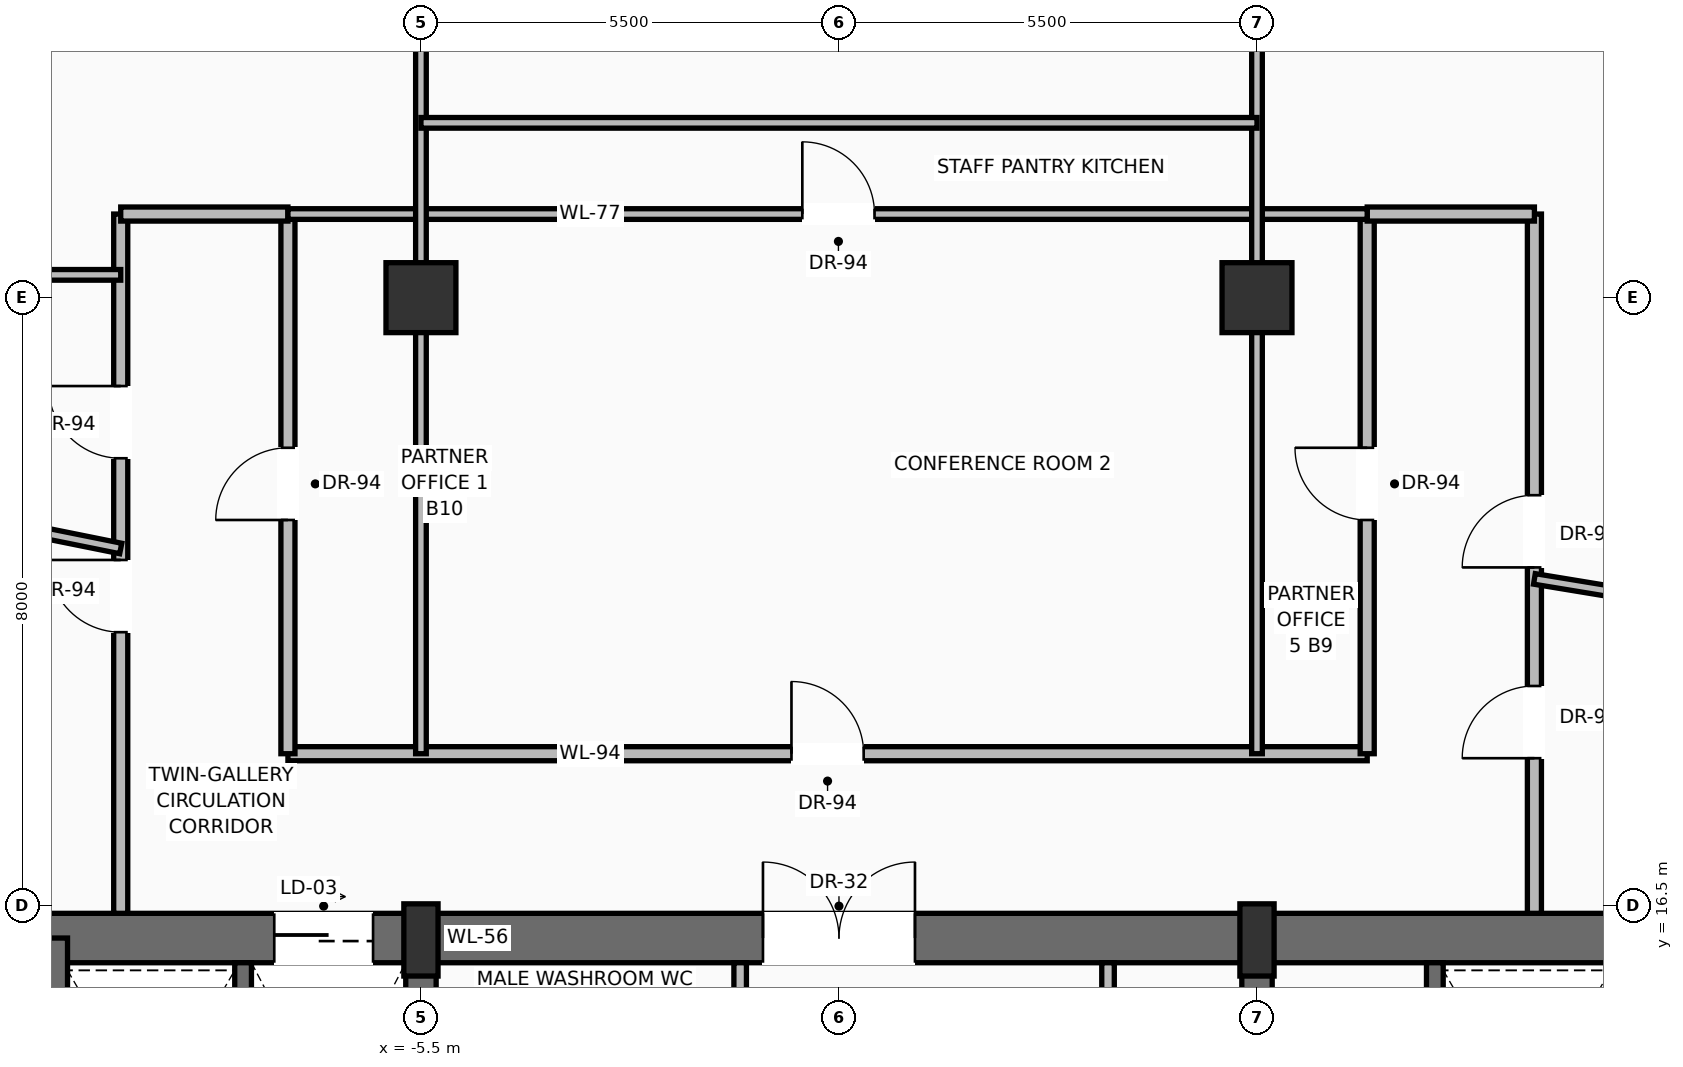
"""IFC4 building model, lengths in metres.
Left out: names, types, materials, properties, quantities, classifications, styles, units other than length and angle.
Written with IfcOpenShell. Run it as: python <this file> out.ifc"""

import sys

from ifc_helpers import new_model, si_unit, direction, frame, frame_2d, origin, origin_2d, place, context, subcontext, project, spatial, rectangle, extrude, source, transform, mapped, element, fill, save


model = new_model("IFC4")
c1 = context("Model", 3, precision=1e-05, world=origin(), true_north=direction((0.0, 1.0)))
c2 = subcontext(c1, "Body", "Model", "MODEL_VIEW")
j1 = project(units=[si_unit("LENGTHUNIT", "METRE"), si_unit("PLANEANGLEUNIT", "RADIAN")], contexts=[c1])
p1 = place(None, origin())
s1 = spatial("IfcSite", under=j1, at=p1, CompositionType="ELEMENT")
p2 = place(p1, origin())
s2 = spatial("IfcBuilding", under=s1, at=p2, CompositionType="ELEMENT")
p3 = place(p2, frame((0.0, 0.0, 178.4)))
s3 = spatial("IfcBuildingStorey", under=s2, at=p3, CompositionType="ELEMENT", Elevation=178.4)
p4 = place(p3, frame((-10.8, 16.075, 0.0), z_axis=(0.0, 0.0, 1.0), x_axis=(1.0, 0.0, 0.0)))
e1 = element("IfcWall", 1, at=p4, inside=s3, PredefinedType="SHEAR", context=c2, shape_type="SweptSolid", body=[
    extrude(rectangle(XDim=21.6, YDim=0.65, at=frame_2d((10.8, 0.0))), origin(), (0.0, 0.0, 1.0), 3.47),
])
p5 = place(p4, frame((3.37, 0.0, 0.0)))
e2 = element("IfcOpeningElement", 2, at=p5, cuts=e1, PredefinedType="OPENING", context=c2, shape_type="SweptSolid", body=[
    extrude(rectangle(XDim=1.3, YDim=2.3, at=frame_2d((0.65, 1.15))), frame((0.0, 0.335, 0.0), z_axis=(0.0, -1.0, 0.0), x_axis=(1.0, 0.0, 0.0)), (0.0, 0.0, 1.0), 0.67),
])
p6 = place(p4, frame((9.8, 0.0, 0.0)))
e3 = element("IfcOpeningElement", 3, at=p6, cuts=e1, PredefinedType="OPENING", context=c2, shape_type="SweptSolid", body=[
    extrude(rectangle(XDim=2.0, YDim=2.4, at=frame_2d((1.0, 1.2))), frame((0.0, 0.335, 0.0), z_axis=(0.0, -1.0, 0.0), x_axis=(1.0, 0.0, 0.0)), (0.0, 0.0, 1.0), 0.67),
])
p7 = place(p3, frame((-10.475, 0.525, 0.0), z_axis=(0.0, 0.0, 1.0), x_axis=(0.0, 1.0, 0.0)))
e4 = element("IfcWall", 4, at=p7, inside=s3, PredefinedType="SHEAR", context=c2, shape_type="SweptSolid", body=[
    extrude(rectangle(XDim=15.55, YDim=0.65, at=frame_2d((7.775, 0.0))), origin(), (0.0, 0.0, 1.0), 3.47),
])
p8 = place(p3, frame((-5.5, 0.525, 0.0), z_axis=(0.0, 0.0, 1.0), x_axis=(0.0, 1.0, 0.0)))
e5 = element("IfcWall", 5, at=p8, inside=s3, PredefinedType="SHEAR", context=c2, shape_type="SweptSolid", body=[
    extrude(rectangle(XDim=15.55, YDim=0.4, at=frame_2d((7.775, 0.0))), origin(), (0.0, 0.0, 1.0), 3.47),
])
p9 = place(p8, frame((8.975, 0.0, 0.0)))
e6 = element("IfcOpeningElement", 6, at=p9, cuts=e5, PredefinedType="OPENING", context=c2, shape_type="SweptSolid", body=[
    extrude(rectangle(XDim=1.1, YDim=2.2, at=frame_2d((0.55, 1.1))), frame((0.0, 0.21, 0.0), z_axis=(0.0, -1.0, 0.0), x_axis=(1.0, 0.0, 0.0)), (0.0, 0.0, 1.0), 0.42),
])
p10 = place(p3, frame((5.5, 0.525, 0.0), z_axis=(0.0, 0.0, 1.0), x_axis=(0.0, 1.0, 0.0)))
e7 = element("IfcWall", 7, at=p10, inside=s3, PredefinedType="SHEAR", context=c2, shape_type="SweptSolid", body=[
    extrude(rectangle(XDim=15.55, YDim=0.4, at=frame_2d((7.775, 0.0))), origin(), (0.0, 0.0, 1.0), 3.47),
])
p11 = place(p10, frame((8.975, 0.0, 0.0)))
e8 = element("IfcOpeningElement", 8, at=p11, cuts=e7, PredefinedType="OPENING", context=c2, shape_type="SweptSolid", body=[
    extrude(rectangle(XDim=1.1, YDim=2.2, at=frame_2d((0.55, 1.1))), frame((0.0, 0.21, 0.0), z_axis=(0.0, -1.0, 0.0), x_axis=(1.0, 0.0, 0.0)), (0.0, 0.0, 1.0), 0.42),
])
m1 = source(origin(), c2, "Body", "SweptSolid", [
    extrude(rectangle(XDim=0.45, YDim=0.95, at=origin_2d()), origin(), (0.0, 0.0, 1.0), 3.7),
])
for number, where, z_axis, x_axis in (
    (9, (-5.5, 16.05, 0.0), (0.0, 0.0, 1.0), (1.0, 0.0, 0.0)),
    (10, (5.5, 16.05, 0.0), (0.0, 0.0, 1.0), (1.0, 0.0, 0.0)),
):
    element("IfcColumn", number, at=place(p3, frame(where, z_axis=z_axis, x_axis=x_axis)), inside=s3, PredefinedType="PILASTER", context=c2, shape_type="MappedRepresentation", body=[
        mapped(m1, transform((0.0, 0.0, 0.0), scale=1.0)),
    ])
m2 = source(origin(), c2, "Body", "SweptSolid", [
    extrude(rectangle(XDim=0.92, YDim=0.92, at=origin_2d()), origin(), (0.0, 0.0, 1.0), 3.7),
])
for number, where, z_axis, x_axis in (
    (11, (-5.5, 24.5, 0.0), (0.0, 0.0, 1.0), (1.0, 0.0, 0.0)),
    (12, (5.5, 24.5, 0.0), (0.0, 0.0, 1.0), (1.0, 0.0, 0.0)),
):
    element("IfcColumn", number, at=place(p3, frame(where, z_axis=z_axis, x_axis=x_axis)), inside=s3, PredefinedType="COLUMN", context=c2, shape_type="MappedRepresentation", body=[
        mapped(m2, transform((0.0, 0.0, 0.0), scale=1.0)),
    ])
p12 = place(p3, frame((10.167, 32.463, 0.0), z_axis=(0.0, 0.0, 1.0), x_axis=(0.535575528783, -0.844487331444, 0.0)))
e13 = element("IfcWall", 13, at=p12, inside=s3, PredefinedType="SOLIDWALL", context=c2, shape_type="SweptSolid", body=[
    extrude(rectangle(XDim=18.76, YDim=0.28, at=frame_2d((9.38, 0.0))), origin(), (0.0, 0.0, 1.0), 3.05),
])
p13 = place(p12, frame((4.502, 0.0, 0.0)))
e14 = element("IfcOpeningElement", 14, at=p13, cuts=e13, PredefinedType="OPENING", context=c2, shape_type="SweptSolid", body=[
    extrude(rectangle(XDim=1.6, YDim=2.35, at=frame_2d((0.8, 1.175))), frame((0.0, 0.15, 0.0), z_axis=(0.0, -1.0, 0.0), x_axis=(1.0, 0.0, 0.0)), (0.0, 0.0, 1.0), 0.3),
])
p14 = place(p12, frame((12.757, 0.0, 0.9)))
e15 = element("IfcOpeningElement", 15, at=p14, cuts=e13, PredefinedType="OPENING", context=c2, shape_type="SweptSolid", body=[
    extrude(rectangle(XDim=1.55, YDim=1.85, at=frame_2d((0.775, 0.925))), frame((0.0, 0.15, 0.0), z_axis=(0.0, -1.0, 0.0), x_axis=(1.0, 0.0, 0.0)), (0.0, 0.0, 1.0), 0.3),
])
for number, where, z_axis, x_axis in (
    (16, (-7.84, 11.87, 0.0), (0.0, 0.0, 1.0), (0.0, 1.0, 0.0)),
    (17, (7.84, 11.87, 0.0), (0.0, 0.0, 1.0), (0.0, 1.0, 0.0)),
):
    element("IfcWall", number, at=place(p3, frame(where, z_axis=z_axis, x_axis=x_axis)), inside=s3, PredefinedType="SOLIDWALL", context=c2, shape_type="SweptSolid", body=[
        extrude(rectangle(XDim=3.88, YDim=0.22, at=frame_2d((1.94, 0.0))), origin(), (0.0, 0.0, 1.0), 3.47),
    ])
p15 = place(p3, frame((-1.3, 13.6, 0.0), z_axis=(0.0, 0.0, 1.0), x_axis=(0.0, 1.0, 0.0)))
e18 = element("IfcWall", 18, at=p15, inside=s3, PredefinedType="PARTITIONING", context=c2, shape_type="SweptSolid", body=[
    extrude(rectangle(XDim=2.15, YDim=0.165, at=frame_2d((1.075, 0.0))), origin(), (0.0, 0.0, 1.0), 3.462),
])
p16 = place(p15, frame((0.55, 0.0, 0.0)))
e19 = element("IfcOpeningElement", 19, at=p16, cuts=e18, PredefinedType="OPENING", context=c2, shape_type="SweptSolid", body=[
    extrude(rectangle(XDim=0.9, YDim=2.1, at=frame_2d((0.45, 1.05))), frame((0.0, 0.093, 0.0), z_axis=(0.0, -1.0, 0.0), x_axis=(1.0, 0.0, 0.0)), (0.0, 0.0, 1.0), 0.185),
])
p17 = place(p3, frame((3.54, 11.22, 0.0), z_axis=(0.0, 0.0, 1.0), x_axis=(0.0, 1.0, 0.0)))
e20 = element("IfcWall", 20, at=p17, inside=s3, PredefinedType="PARTITIONING", context=c2, shape_type="SweptSolid", body=[
    extrude(rectangle(XDim=4.53, YDim=0.165, at=frame_2d((2.265, 0.0))), origin(), (0.0, 0.0, 1.0), 3.462),
])
p18 = place(p17, frame((1.25, 0.0, 0.0)))
e21 = element("IfcOpeningElement", 21, at=p18, cuts=e20, PredefinedType="OPENING", context=c2, shape_type="SweptSolid", body=[
    extrude(rectangle(XDim=0.9, YDim=2.1, at=frame_2d((0.45, 1.05))), frame((0.0, 0.093, 0.0), z_axis=(0.0, -1.0, 0.0), x_axis=(1.0, 0.0, 0.0)), (0.0, 0.0, 1.0), 0.185),
])
p19 = place(p3, frame((-7.25, 18.5, 0.0), z_axis=(0.0, 0.0, 1.0), x_axis=(1.0, 0.0, 0.0)))
e22 = element("IfcWall", 22, at=p19, inside=s3, PredefinedType="PARTITIONING", context=c2, shape_type="SweptSolid", body=[
    extrude(rectangle(XDim=14.2, YDim=0.185, at=frame_2d((7.1, 0.0))), origin(), (0.0, 0.0, 1.0), 2.846),
])
p20 = place(p19, frame((6.625, 0.0, 0.0)))
e23 = element("IfcOpeningElement", 23, at=p20, cuts=e22, PredefinedType="OPENING", context=c2, shape_type="SweptSolid", body=[
    extrude(rectangle(XDim=0.95, YDim=2.2, at=frame_2d((0.475, 1.1))), frame((0.0, 0.103, 0.0), z_axis=(0.0, -1.0, 0.0), x_axis=(1.0, 0.0, 0.0)), (0.0, 0.0, 1.0), 0.205),
])
p21 = place(p3, frame((-7.25, 18.5, 0.0), z_axis=(0.0, 0.0, 1.0), x_axis=(0.0, 1.0, 0.0)))
e24 = element("IfcWall", 24, at=p21, inside=s3, PredefinedType="PARTITIONING", context=c2, shape_type="SweptSolid", body=[
    extrude(rectangle(XDim=7.1, YDim=0.185, at=frame_2d((3.55, 0.0))), origin(), (0.0, 0.0, 1.0), 2.846),
])
p22 = place(p21, frame((3.075, 0.0, 0.0)))
e25 = element("IfcOpeningElement", 25, at=p22, cuts=e24, PredefinedType="OPENING", context=c2, shape_type="SweptSolid", body=[
    extrude(rectangle(XDim=0.95, YDim=2.2, at=frame_2d((0.475, 1.1))), frame((0.0, 0.103, 0.0), z_axis=(0.0, -1.0, 0.0), x_axis=(1.0, 0.0, 0.0)), (0.0, 0.0, 1.0), 0.205),
])
p23 = place(p3, frame((6.95, 18.5, 0.0), z_axis=(0.0, 0.0, 1.0), x_axis=(0.0, 1.0, 0.0)))
e26 = element("IfcWall", 26, at=p23, inside=s3, PredefinedType="PARTITIONING", context=c2, shape_type="SweptSolid", body=[
    extrude(rectangle(XDim=7.1, YDim=0.185, at=frame_2d((3.55, 0.0))), origin(), (0.0, 0.0, 1.0), 2.846),
])
p24 = place(p23, frame((3.075, 0.0, 0.0)))
e27 = element("IfcOpeningElement", 27, at=p24, cuts=e26, PredefinedType="OPENING", context=c2, shape_type="SweptSolid", body=[
    extrude(rectangle(XDim=0.95, YDim=2.2, at=frame_2d((0.475, 1.1))), frame((0.0, 0.103, 0.0), z_axis=(0.0, -1.0, 0.0), x_axis=(1.0, 0.0, 0.0)), (0.0, 0.0, 1.0), 0.205),
])
p25 = place(p3, frame((-9.45, 16.4, 0.0), z_axis=(0.0, 0.0, 1.0), x_axis=(0.0, 1.0, 0.0)))
e28 = element("IfcWall", 28, at=p25, inside=s3, PredefinedType="PARTITIONING", context=c2, shape_type="SweptSolid", body=[
    extrude(rectangle(XDim=9.2, YDim=0.185, at=frame_2d((4.6, 0.0))), origin(), (0.0, 0.0, 1.0), 2.846),
])
p26 = place(p25, frame((3.699, 0.0, 0.0)))
e29 = element("IfcOpeningElement", 29, at=p26, cuts=e28, PredefinedType="OPENING", context=c2, shape_type="SweptSolid", body=[
    extrude(rectangle(XDim=0.95, YDim=2.2, at=frame_2d((0.475, 1.1))), frame((0.0, 0.103, 0.0), z_axis=(0.0, -1.0, 0.0), x_axis=(1.0, 0.0, 0.0)), (0.0, 0.0, 1.0), 0.205),
])
p27 = place(p25, frame((5.987, 0.0, 0.0)))
e30 = element("IfcOpeningElement", 30, at=p27, cuts=e28, PredefinedType="OPENING", context=c2, shape_type="SweptSolid", body=[
    extrude(rectangle(XDim=0.95, YDim=2.2, at=frame_2d((0.475, 1.1))), frame((0.0, 0.103, 0.0), z_axis=(0.0, -1.0, 0.0), x_axis=(1.0, 0.0, 0.0)), (0.0, 0.0, 1.0), 0.205),
])
p28 = place(p3, frame((9.15, 16.4, 0.0), z_axis=(0.0, 0.0, 1.0), x_axis=(0.0, 1.0, 0.0)))
e31 = element("IfcWall", 31, at=p28, inside=s3, PredefinedType="PARTITIONING", context=c2, shape_type="SweptSolid", body=[
    extrude(rectangle(XDim=9.2, YDim=0.185, at=frame_2d((4.6, 0.0))), origin(), (0.0, 0.0, 1.0), 2.846),
])
p29 = place(p28, frame((4.551, 0.0, 0.0)))
e32 = element("IfcOpeningElement", 32, at=p29, cuts=e31, PredefinedType="OPENING", context=c2, shape_type="SweptSolid", body=[
    extrude(rectangle(XDim=0.95, YDim=2.2, at=frame_2d((0.475, 1.1))), frame((0.0, 0.103, 0.0), z_axis=(0.0, -1.0, 0.0), x_axis=(1.0, 0.0, 0.0)), (0.0, 0.0, 1.0), 0.205),
])
p30 = place(p28, frame((2.041, 0.0, 0.0)))
e33 = element("IfcOpeningElement", 33, at=p30, cuts=e31, PredefinedType="OPENING", context=c2, shape_type="SweptSolid", body=[
    extrude(rectangle(XDim=0.95, YDim=2.2, at=frame_2d((0.475, 1.1))), frame((0.0, 0.103, 0.0), z_axis=(0.0, -1.0, 0.0), x_axis=(1.0, 0.0, 0.0)), (0.0, 0.0, 1.0), 0.205),
])
for number, where, z_axis, x_axis in (
    (34, (-9.45, 25.6, 0.0), (0.0, 0.0, 1.0), (1.0, 0.0, 0.0)),
    (35, (6.95, 25.6, 0.0), (0.0, 0.0, 1.0), (1.0, 0.0, 0.0)),
):
    element("IfcWall", number, at=place(p3, frame(where, z_axis=z_axis, x_axis=x_axis)), inside=s3, PredefinedType="PARTITIONING", context=c2, shape_type="SweptSolid", body=[
        extrude(rectangle(XDim=2.2, YDim=0.185, at=frame_2d((1.1, 0.0))), origin(), (0.0, 0.0, 1.0), 3.462),
    ])
p31 = place(p3, frame((-7.25, 25.6, 0.0), z_axis=(0.0, 0.0, 1.0), x_axis=(1.0, 0.0, 0.0)))
e36 = element("IfcWall", 36, at=p31, inside=s3, PredefinedType="PARTITIONING", context=c2, shape_type="SweptSolid", body=[
    extrude(rectangle(XDim=14.2, YDim=0.14, at=frame_2d((7.1, 0.0))), origin(), (0.0, 0.0, 1.0), 3.462),
])
p32 = place(p31, frame((6.768, 0.0, 0.0)))
e37 = element("IfcOpeningElement", 37, at=p32, cuts=e36, PredefinedType="OPENING", context=c2, shape_type="SweptSolid", body=[
    extrude(rectangle(XDim=0.95, YDim=2.2, at=frame_2d((0.475, 1.1))), frame((0.0, 0.08, 0.0), z_axis=(0.0, -1.0, 0.0), x_axis=(1.0, 0.0, 0.0)), (0.0, 0.0, 1.0), 0.16),
])
for number, where, z_axis, x_axis in (
    (38, (-5.5, 18.5, 0.0), (0.0, 0.0, 1.0), (0.0, 1.0, 0.0)),
    (39, (5.5, 18.5, 0.0), (0.0, 0.0, 1.0), (0.0, 1.0, 0.0)),
):
    element("IfcWall", number, at=place(p3, frame(where, z_axis=z_axis, x_axis=x_axis)), inside=s3, PredefinedType="PARTITIONING", context=c2, shape_type="SweptSolid", body=[
        extrude(rectangle(XDim=14.0, YDim=0.14, at=frame_2d((7.0, 0.0))), origin(), (0.0, 0.0, 1.0), 2.846),
    ])
p33 = place(p3, frame((-5.5, 26.8, 0.0), z_axis=(0.0, 0.0, 1.0), x_axis=(1.0, 0.0, 0.0)))
e40 = element("IfcWall", 40, at=p33, inside=s3, PredefinedType="PARTITIONING", context=c2, shape_type="SweptSolid", body=[
    extrude(rectangle(XDim=11.0, YDim=0.14, at=frame_2d((5.5, 0.0))), origin(), (0.0, 0.0, 1.0), 3.462),
])
p34 = place(p3, frame((-16.728, 22.667, 0.0), z_axis=(0.0, 0.0, 1.0), x_axis=(0.980268299124, -0.197671600726, 0.0)))
e41 = element("IfcWall", 41, at=p34, inside=s3, PredefinedType="PARTITIONING", context=c2, shape_type="SweptSolid", body=[
    extrude(rectangle(XDim=7.424, YDim=0.14, at=frame_2d((3.712, 0.0))), origin(), (0.0, 0.0, 1.0), 3.049),
])
p35 = place(p3, frame((-15.394, 24.8, 0.0), z_axis=(0.0, 0.0, 1.0), x_axis=(1.0, 0.0, 0.0)))
e42 = element("IfcWall", 42, at=p35, inside=s3, PredefinedType="PARTITIONING", context=c2, shape_type="SweptSolid", body=[
    extrude(rectangle(XDim=5.944, YDim=0.14, at=frame_2d((2.972, 0.0))), origin(), (0.0, 0.0, 1.0), 3.462),
])
p36 = place(p3, frame((9.15, 20.8, 0.0), z_axis=(0.0, 0.0, 1.0), x_axis=(0.986738202505, -0.162319806916, 0.0)))
e43 = element("IfcWall", 43, at=p36, inside=s3, PredefinedType="PARTITIONING", context=c2, shape_type="SweptSolid", body=[
    extrude(rectangle(XDim=9.694, YDim=0.14, at=frame_2d((4.847, 0.0))), origin(), (0.0, 0.0, 1.0), 3.049),
])
m3 = source(origin(), c2, "Body", "SweptSolid", [
    extrude(rectangle(XDim=1.3, YDim=2.3, at=frame_2d((0.65, 1.15))), frame((0.0, 0.025, 0.0), z_axis=(0.0, -1.0, 0.0), x_axis=(1.0, 0.0, 0.0)), (0.0, 0.0, 1.0), 0.05),
])
p37 = place(p5, origin())
e44 = element("IfcDoor", 44, at=p37, inside=s3, OperationType="SLIDING_TO_RIGHT", PredefinedType="DOOR", context=c2, shape_type="MappedRepresentation", body=[
    mapped(m3, transform((0.0, 0.0, 0.0), scale=1.0)),
])
fill(e2, e44)
m4 = source(origin(), c2, "Body", "SweptSolid", [
    extrude(rectangle(XDim=2.0, YDim=2.4, at=frame_2d((1.0, 1.2))), frame((0.0, 0.025, 0.0), z_axis=(0.0, -1.0, 0.0), x_axis=(1.0, 0.0, 0.0)), (0.0, 0.0, 1.0), 0.05),
])
p38 = place(p6, origin())
e45 = element("IfcDoor", 45, at=p38, inside=s3, OperationType="DOUBLE_DOOR_SINGLE_SWING", PredefinedType="DOOR", context=c2, shape_type="MappedRepresentation", body=[
    mapped(m4, transform((0.0, 0.0, 0.0), scale=1.0)),
])
fill(e3, e45)
m5 = source(origin(), c2, "Body", "SweptSolid", [
    extrude(rectangle(XDim=0.95, YDim=2.2, at=frame_2d((0.475, 1.1))), frame((0.0, 0.025, 0.0), z_axis=(0.0, -1.0, 0.0), x_axis=(1.0, 0.0, 0.0)), (0.0, 0.0, 1.0), 0.05),
])
p39 = place(p20, origin())
e46 = element("IfcDoor", 46, at=p39, inside=s3, OperationType="SINGLE_SWING_LEFT", PredefinedType="DOOR", context=c2, shape_type="MappedRepresentation", body=[
    mapped(m5, transform((0.0, 0.0, 0.0), scale=1.0)),
])
fill(e23, e46)
p40 = place(p26, origin())
e47 = element("IfcDoor", 47, at=p40, inside=s3, OperationType="SINGLE_SWING_RIGHT", PredefinedType="DOOR", context=c2, shape_type="MappedRepresentation", body=[
    mapped(m5, transform((0.0, 0.0, 0.0), scale=1.0)),
])
fill(e29, e47)
p41 = place(p29, origin())
e48 = element("IfcDoor", 48, at=p41, inside=s3, OperationType="SINGLE_SWING_LEFT", PredefinedType="DOOR", context=c2, shape_type="MappedRepresentation", body=[
    mapped(m5, transform((0.0, 0.0, 0.0), scale=1.0)),
])
fill(e32, e48)
p42 = place(p30, origin())
e49 = element("IfcDoor", 49, at=p42, inside=s3, OperationType="SINGLE_SWING_LEFT", PredefinedType="DOOR", context=c2, shape_type="MappedRepresentation", body=[
    mapped(m5, transform((0.0, 0.0, 0.0), scale=1.0)),
])
fill(e33, e49)
p43 = place(p24, origin())
e50 = element("IfcDoor", 50, at=p43, inside=s3, OperationType="SINGLE_SWING_RIGHT", PredefinedType="DOOR", context=c2, shape_type="MappedRepresentation", body=[
    mapped(m5, transform((0.0, 0.0, 0.0), scale=1.0)),
])
fill(e27, e50)
p44 = place(p22, origin())
e51 = element("IfcDoor", 51, at=p44, inside=s3, OperationType="SINGLE_SWING_LEFT", PredefinedType="DOOR", context=c2, shape_type="MappedRepresentation", body=[
    mapped(m5, transform((0.0, 0.0, 0.0), scale=1.0)),
])
fill(e25, e51)
p45 = place(p27, origin())
e52 = element("IfcDoor", 52, at=p45, inside=s3, OperationType="SINGLE_SWING_RIGHT", PredefinedType="DOOR", context=c2, shape_type="MappedRepresentation", body=[
    mapped(m5, transform((0.0, 0.0, 0.0), scale=1.0)),
])
fill(e30, e52)
p46 = place(p32, origin())
e53 = element("IfcDoor", 53, at=p46, inside=s3, OperationType="SINGLE_SWING_LEFT", PredefinedType="DOOR", context=c2, shape_type="MappedRepresentation", body=[
    mapped(m5, transform((0.0, 0.0, 0.0), scale=1.0)),
])
fill(e37, e53)
save(model, sys.argv[1])
